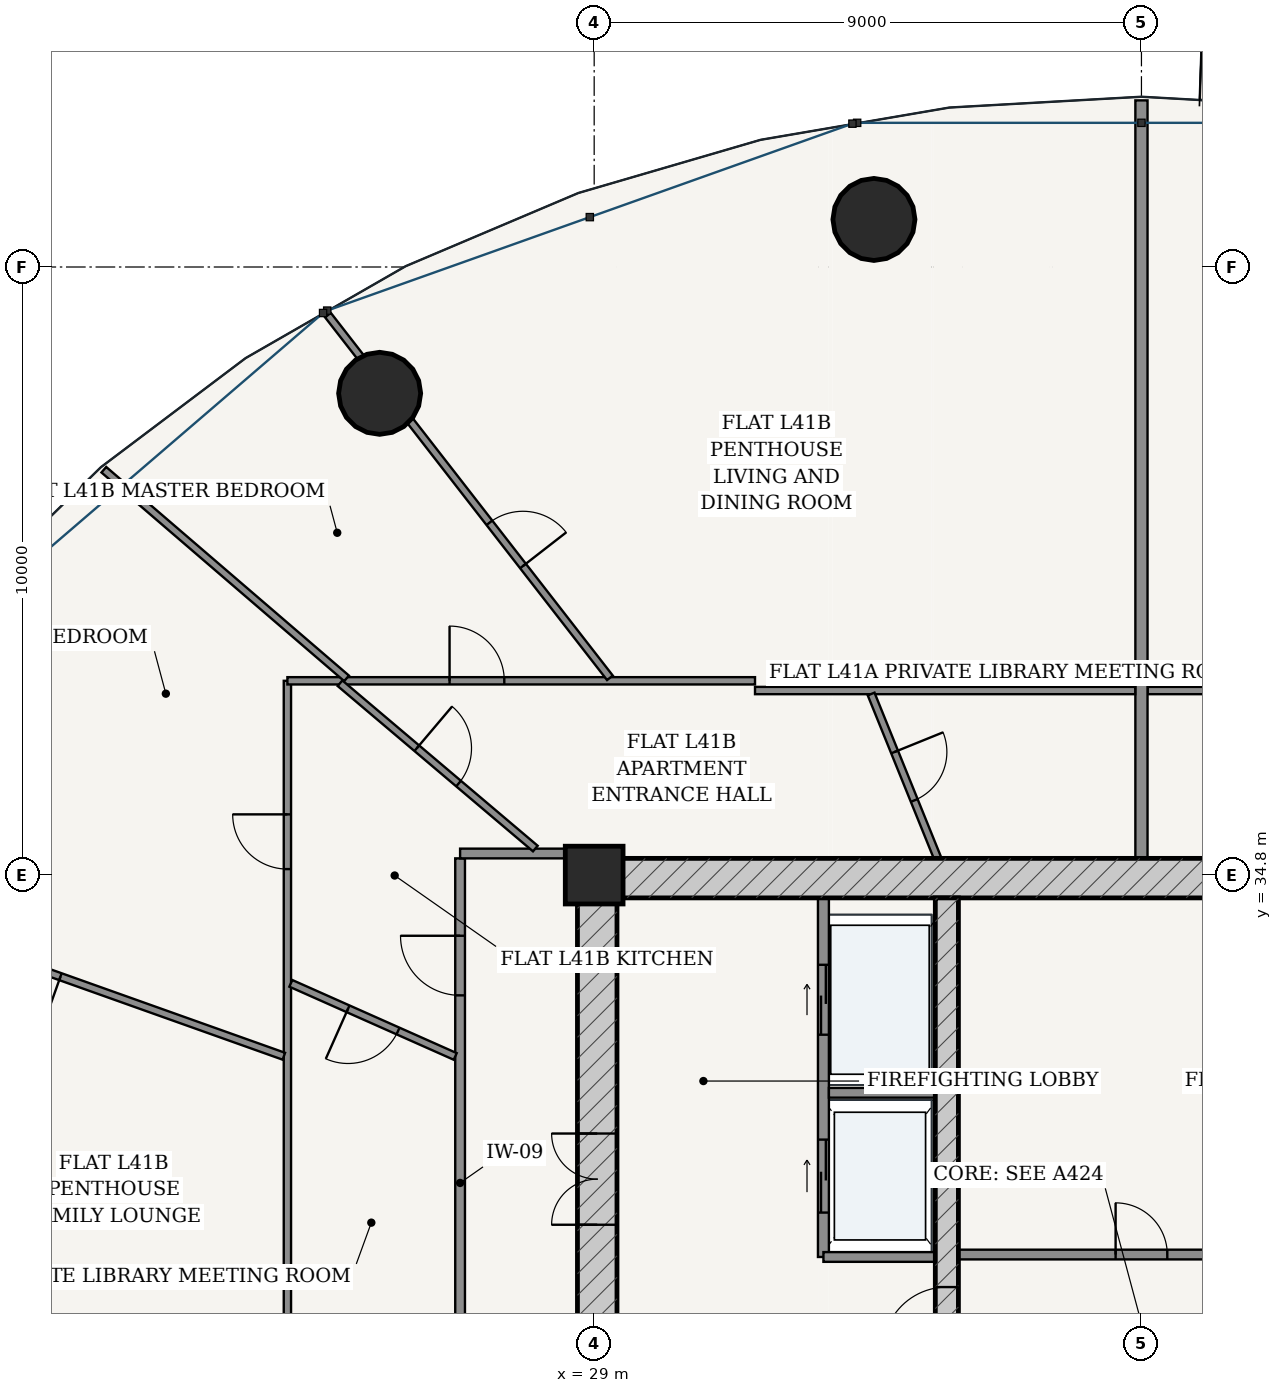
"""IFC4 building model, lengths in metres.
Left out: names, types, materials, properties, quantities, classifications, styles, units other than length and angle.
Written with IfcOpenShell. Run it as: python <this file> out.ifc"""

import sys

from ifc_helpers import new_model, si_unit, direction, frame, frame_2d, origin, origin_2d, place, context, subcontext, project, spatial, rectangle, hollow_circle, extrude, source, transform, mapped, element, fill, save


model = new_model("IFC4")
c1 = context("Model", 3, precision=1e-05, world=origin(), true_north=direction((-0.2419218956, 0.970295726276)))
c2 = subcontext(c1, "Body", "Model", "MODEL_VIEW")
j1 = project(units=[si_unit("LENGTHUNIT", "METRE"), si_unit("PLANEANGLEUNIT", "RADIAN")], contexts=[c1])
p1 = place(None, origin())
s1 = spatial("IfcSite", under=j1, at=p1, CompositionType="ELEMENT")
p2 = place(p1, origin())
s2 = spatial("IfcBuilding", under=s1, at=p2, CompositionType="ELEMENT")
p3 = place(p2, frame((0.0, 0.0, 157.0)))
s3 = spatial("IfcBuildingStorey", under=s2, at=p3, CompositionType="ELEMENT", Elevation=157.0)
p4 = place(p3, frame((29.0, 34.8, 0.0), z_axis=(0.0, 0.0, 1.0), x_axis=(1.0, 0.0, 0.0)))
e1 = element("IfcColumn", 1, at=p4, inside=s3, PredefinedType="COLUMN", context=c2, shape_type="SweptSolid", body=[
    extrude(rectangle(XDim=0.95, YDim=0.95, at=origin_2d()), origin(), (0.0, 0.0, 1.0), 3.6),
])
p5 = place(p3, frame((28.725, 34.75, 0.0), z_axis=(0.0, 0.0, 1.0), x_axis=(1.0, 0.0, 0.0)))
e2 = element("IfcWall", 2, at=p5, inside=s3, PredefinedType="SHEAR", context=c2, shape_type="SweptSolid", body=[
    extrude(rectangle(XDim=18.55, YDim=0.65, at=frame_2d((9.275, 0.0))), origin(), (0.0, 0.0, 1.0), 3.33),
])
p6 = place(p3, frame((29.05, 19.175, 0.0), z_axis=(0.0, 0.0, 1.0), x_axis=(0.0, 1.0, 0.0)))
e3 = element("IfcWall", 3, at=p6, inside=s3, PredefinedType="SHEAR", context=c2, shape_type="SweptSolid", body=[
    extrude(rectangle(XDim=15.25, YDim=0.65, at=frame_2d((7.625, 0.0))), origin(), (0.0, 0.0, 1.0), 3.33),
])
p7 = place(p6, frame((9.875, 0.0, 0.0)))
e4 = element("IfcOpeningElement", 4, at=p7, cuts=e3, PredefinedType="OPENING", context=c2, shape_type="SweptSolid", body=[
    extrude(rectangle(XDim=1.5, YDim=2.2, at=frame_2d((0.75, 1.1))), frame((0.0, 0.335, 0.0), z_axis=(0.0, -1.0, 0.0), x_axis=(1.0, 0.0, 0.0)), (0.0, 0.0, 1.0), 0.67),
])
p8 = place(p3, frame((34.8, 19.175, 0.0), z_axis=(0.0, 0.0, 1.0), x_axis=(0.0, 1.0, 0.0)))
e5 = element("IfcWall", 5, at=p8, inside=s3, PredefinedType="SHEAR", context=c2, shape_type="SweptSolid", body=[
    extrude(rectangle(XDim=15.25, YDim=0.38, at=frame_2d((7.625, 0.0))), origin(), (0.0, 0.0, 1.0), 3.33),
])
p9 = place(p8, frame((7.8, 0.0, 0.0)))
e6 = element("IfcOpeningElement", 6, at=p9, cuts=e5, PredefinedType="OPENING", context=c2, shape_type="SweptSolid", body=[
    extrude(rectangle(XDim=1.05, YDim=2.15, at=frame_2d((0.525, 1.075))), frame((0.0, 0.2, 0.0), z_axis=(0.0, -1.0, 0.0), x_axis=(1.0, 0.0, 0.0)), (0.0, 0.0, 1.0), 0.4),
])
for number, where, z_axis, x_axis in (
    (7, (33.601, 45.582, 0.0), (0.0, 0.0, 1.0), (1.0, 0.0, 0.0)),
    (8, (25.472, 42.723, 0.0), (0.0, 0.0, 1.0), (1.0, 0.0, 0.0)),
):
    element("IfcColumn", number, at=place(p3, frame(where, z_axis=z_axis, x_axis=x_axis)), inside=s3, PredefinedType="COLUMN", context=c2, shape_type="SweptSolid", body=[
        extrude(hollow_circle(Radius=0.675, WallThickness=0.042, at=origin_2d()), origin(), (0.0, 0.0, 1.0), 3.6),
    ])
p10 = place(p3, frame((32.77, 28.52, 0.0), z_axis=(0.0, 0.0, 1.0), x_axis=(0.0, 1.0, 0.0)))
e9 = element("IfcWall", 9, at=p10, inside=s3, PredefinedType="PARTITIONING", context=c2, shape_type="SweptSolid", body=[
    extrude(rectangle(XDim=5.905, YDim=0.18, at=frame_2d((2.953, 0.0))), origin(), (0.0, 0.0, 1.0), 3.33),
])
p11 = place(p10, frame((3.655, 0.0, 0.0)))
e10 = element("IfcOpeningElement", 10, at=p11, cuts=e9, PredefinedType="OPENING", context=c2, shape_type="SweptSolid", body=[
    extrude(rectangle(XDim=1.15, YDim=2.2, at=frame_2d((0.575, 1.1))), frame((0.0, 0.1, 0.0), z_axis=(0.0, -1.0, 0.0), x_axis=(1.0, 0.0, 0.0)), (0.0, 0.0, 1.0), 0.2),
])
p12 = place(p10, frame((0.73, 0.0, 0.0)))
e11 = element("IfcOpeningElement", 11, at=p12, cuts=e9, PredefinedType="OPENING", context=c2, shape_type="SweptSolid", body=[
    extrude(rectangle(XDim=1.2, YDim=2.25, at=frame_2d((0.6, 1.125))), frame((0.0, 0.1, 0.0), z_axis=(0.0, -1.0, 0.0), x_axis=(1.0, 0.0, 0.0)), (0.0, 0.0, 1.0), 0.2),
])
p13 = place(p3, frame((32.86, 31.22, 0.0), z_axis=(0.0, 0.0, 1.0), x_axis=(1.0, 0.0, 0.0)))
e12 = element("IfcWall", 12, at=p13, inside=s3, PredefinedType="PARTITIONING", context=c2, shape_type="SweptSolid", body=[
    extrude(rectangle(XDim=1.75, YDim=0.16, at=frame_2d((0.875, 0.0))), origin(), (0.0, 0.0, 1.0), 3.33),
])
p14 = place(p3, frame((32.77, 28.52, 0.0), z_axis=(0.0, 0.0, 1.0), x_axis=(1.0, 0.0, 0.0)))
e13 = element("IfcWall", 13, at=p14, inside=s3, PredefinedType="PARTITIONING", context=c2, shape_type="SweptSolid", body=[
    extrude(rectangle(XDim=1.84, YDim=0.16, at=frame_2d((0.92, 0.0))), origin(), (0.0, 0.0, 1.0), 3.33),
])
p15 = place(p3, frame((34.99, 28.56, 0.0), z_axis=(0.0, 0.0, 1.0), x_axis=(1.0, 0.0, 0.0)))
e14 = element("IfcWall", 14, at=p15, inside=s3, PredefinedType="PARTITIONING", context=c2, shape_type="SweptSolid", body=[
    extrude(rectangle(XDim=6.02, YDim=0.16, at=frame_2d((3.01, 0.0))), origin(), (0.0, 0.0, 1.0), 3.33),
])
p16 = place(p15, frame((2.585, 0.0, 0.0)))
e15 = element("IfcOpeningElement", 15, at=p16, cuts=e14, PredefinedType="OPENING", context=c2, shape_type="SweptSolid", body=[
    extrude(rectangle(XDim=0.85, YDim=2.1, at=frame_2d((0.425, 1.05))), frame((0.0, 0.09, 0.0), z_axis=(0.0, -1.0, 0.0), x_axis=(1.0, 0.0, 0.0)), (0.0, 0.0, 1.0), 0.18),
])
p17 = place(p3, frame((26.795, 24.4, 0.0), z_axis=(0.0, 0.0, 1.0), x_axis=(0.0, 1.0, 0.0)))
e16 = element("IfcWall", 16, at=p17, inside=s3, PredefinedType="PARTITIONING", context=c2, shape_type="SweptSolid", body=[
    extrude(rectangle(XDim=10.675, YDim=0.16, at=frame_2d((5.337, 0.0))), origin(), (0.0, 0.0, 1.0), 2.776),
])
p18 = place(p17, frame((8.422, 0.0, 0.0)))
e17 = element("IfcOpeningElement", 17, at=p18, cuts=e16, PredefinedType="OPENING", context=c2, shape_type="SweptSolid", body=[
    extrude(rectangle(XDim=0.98, YDim=2.2, at=frame_2d((0.49, 1.1))), frame((0.0, 0.09, 0.0), z_axis=(0.0, -1.0, 0.0), x_axis=(1.0, 0.0, 0.0)), (0.0, 0.0, 1.0), 0.18),
])
p19 = place(p3, frame((26.795, 35.155, 0.0), z_axis=(0.0, 0.0, 1.0), x_axis=(1.0, 0.0, 0.0)))
e18 = element("IfcWall", 18, at=p19, inside=s3, PredefinedType="PARTITIONING", context=c2, shape_type="SweptSolid", body=[
    extrude(rectangle(XDim=1.93, YDim=0.16, at=frame_2d((0.965, 0.0))), origin(), (0.0, 0.0, 1.0), 2.776),
])
p20 = place(p3, frame((38.102, 37.835, 0.0), z_axis=(0.0, 0.0, 1.0), x_axis=(1.0, 0.0, 0.0)))
e19 = element("IfcWall", 19, at=p20, inside=s3, PredefinedType="PARTITIONING", context=c2, shape_type="SweptSolid", body=[
    extrude(rectangle(XDim=6.253, YDim=0.12, at=frame_2d((3.126, 0.0))), origin(), (0.0, 0.0, 1.0), 2.776),
])
p21 = place(p20, frame((3.742, 0.0, 0.0)))
e20 = element("IfcOpeningElement", 20, at=p21, cuts=e19, PredefinedType="OPENING", context=c2, shape_type="SweptSolid", body=[
    extrude(rectangle(XDim=0.9, YDim=2.15, at=frame_2d((0.45, 1.075))), frame((0.0, 0.07, 0.0), z_axis=(0.0, -1.0, 0.0), x_axis=(1.0, 0.0, 0.0)), (0.0, 0.0, 1.0), 0.14),
])
p22 = place(p3, frame((38.0, 35.075, 0.0), z_axis=(0.0, 0.0, 1.0), x_axis=(0.0, 1.0, 0.0)))
e21 = element("IfcWall", 21, at=p22, inside=s3, PredefinedType="PARTITIONING", context=c2, shape_type="SweptSolid", body=[
    extrude(rectangle(XDim=12.465, YDim=0.2, at=frame_2d((6.232, 0.0))), origin(), (0.0, 0.0, 1.0), 2.415),
])
p23 = place(p3, frame((23.955, 26.902, 0.0), z_axis=(0.0, 0.0, 1.0), x_axis=(0.0, 1.0, 0.0)))
e22 = element("IfcWall", 22, at=p23, inside=s3, PredefinedType="PARTITIONING", context=c2, shape_type="SweptSolid", body=[
    extrude(rectangle(XDim=11.093, YDim=0.12, at=frame_2d((5.546, 0.0))), origin(), (0.0, 0.0, 1.0), 2.776),
])
p24 = place(p23, frame((7.997, 0.0, 0.0)))
e23 = element("IfcOpeningElement", 23, at=p24, cuts=e22, PredefinedType="OPENING", context=c2, shape_type="SweptSolid", body=[
    extrude(rectangle(XDim=0.9, YDim=2.15, at=frame_2d((0.45, 1.075))), frame((0.0, 0.07, 0.0), z_axis=(0.0, -1.0, 0.0), x_axis=(1.0, 0.0, 0.0)), (0.0, 0.0, 1.0), 0.14),
])
p25 = place(p3, frame((23.955, 37.995, 0.0), z_axis=(0.0, 0.0, 1.0), x_axis=(1.0, 0.0, 0.0)))
e24 = element("IfcWall", 24, at=p25, inside=s3, PredefinedType="PARTITIONING", context=c2, shape_type="SweptSolid", body=[
    extrude(rectangle(XDim=7.69, YDim=0.12, at=frame_2d((3.845, 0.0))), origin(), (0.0, 0.0, 1.0), 2.776),
])
p26 = place(p25, frame((2.667, 0.0, 0.0)))
e25 = element("IfcOpeningElement", 25, at=p26, cuts=e24, PredefinedType="OPENING", context=c2, shape_type="SweptSolid", body=[
    extrude(rectangle(XDim=0.9, YDim=2.15, at=frame_2d((0.45, 1.075))), frame((0.0, 0.07, 0.0), z_axis=(0.0, -1.0, 0.0), x_axis=(1.0, 0.0, 0.0)), (0.0, 0.0, 1.0), 0.14),
])
p27 = place(p3, frame((31.645, 37.835, 0.0), z_axis=(0.0, 0.0, 1.0), x_axis=(1.0, 0.0, 0.0)))
e26 = element("IfcWall", 26, at=p27, inside=s3, PredefinedType="PARTITIONING", context=c2, shape_type="SweptSolid", body=[
    extrude(rectangle(XDim=6.253, YDim=0.12, at=frame_2d((3.126, 0.0))), origin(), (0.0, 0.0, 1.0), 2.776),
])
p28 = place(p3, frame((29.259, 38.044, 0.0), z_axis=(0.0, 0.0, 1.0), x_axis=(-0.613770587295, 0.789484430607, 0.0)))
e27 = element("IfcWall", 27, at=p28, inside=s3, PredefinedType="PARTITIONING", context=c2, shape_type="SweptSolid", body=[
    extrude(rectangle(XDim=7.556, YDim=0.12, at=frame_2d((3.778, 0.0))), origin(), (0.0, 0.0, 1.0), 2.776),
])
p29 = place(p28, frame((2.33, 0.0, 0.0)))
e28 = element("IfcOpeningElement", 28, at=p29, cuts=e27, PredefinedType="OPENING", context=c2, shape_type="SweptSolid", body=[
    extrude(rectangle(XDim=0.9, YDim=2.15, at=frame_2d((0.45, 1.075))), frame((0.0, 0.07, 0.0), z_axis=(0.0, -1.0, 0.0), x_axis=(1.0, 0.0, 0.0)), (0.0, 0.0, 1.0), 0.14),
])
p30 = place(p3, frame((24.928, 38.035, 0.0), z_axis=(0.0, 0.0, 1.0), x_axis=(-0.758368609512, 0.65182593697, 0.0)))
e29 = element("IfcWall", 29, at=p30, inside=s3, PredefinedType="PARTITIONING", context=c2, shape_type="SweptSolid", body=[
    extrude(rectangle(XDim=5.263, YDim=0.12, at=frame_2d((2.632, 0.0))), origin(), (0.0, 0.0, 1.0), 2.846),
])
p31 = place(p3, frame((23.896, 31.821, 0.0), z_axis=(0.0, 0.0, 1.0), x_axis=(-0.942072876428, 0.335408251983, 0.0)))
e30 = element("IfcWall", 30, at=p31, inside=s3, PredefinedType="PARTITIONING", context=c2, shape_type="SweptSolid", body=[
    extrude(rectangle(XDim=8.7, YDim=0.12, at=frame_2d((4.35, 0.0))), origin(), (0.0, 0.0, 1.0), 2.846),
])
p32 = place(p31, frame((3.9, 0.0, 0.0)))
e31 = element("IfcOpeningElement", 31, at=p32, cuts=e30, PredefinedType="OPENING", context=c2, shape_type="SweptSolid", body=[
    extrude(rectangle(XDim=0.9, YDim=2.15, at=frame_2d((0.45, 1.075))), frame((0.0, 0.07, 0.0), z_axis=(0.0, -1.0, 0.0), x_axis=(1.0, 0.0, 0.0)), (0.0, 0.0, 1.0), 0.14),
])
p33 = place(p3, frame((34.649, 35.075, 0.0), z_axis=(0.0, 0.0, 1.0), x_axis=(-0.37535719187, 0.926880239573, 0.0)))
e32 = element("IfcWall", 32, at=p33, inside=s3, PredefinedType="PARTITIONING", context=c2, shape_type="SweptSolid", body=[
    extrude(rectangle(XDim=2.916, YDim=0.12, at=frame_2d((1.458, 0.0))), origin(), (0.0, 0.0, 1.0), 3.33),
])
p34 = place(p33, frame((1.028, 0.0, 0.0)))
e33 = element("IfcOpeningElement", 33, at=p34, cuts=e32, PredefinedType="OPENING", context=c2, shape_type="SweptSolid", body=[
    extrude(rectangle(XDim=0.86, YDim=2.15, at=frame_2d((0.43, 1.075))), frame((0.0, 0.07, 0.0), z_axis=(0.0, -1.0, 0.0), x_axis=(1.0, 0.0, 0.0)), (0.0, 0.0, 1.0), 0.14),
])
p35 = place(p3, frame((28.032, 35.236, 0.0), z_axis=(0.0, 0.0, 1.0), x_axis=(-0.763324664245, 0.646015059388, 0.0)))
e34 = element("IfcWall", 34, at=p35, inside=s3, PredefinedType="PARTITIONING", context=c2, shape_type="SweptSolid", body=[
    extrude(rectangle(XDim=4.208, YDim=0.12, at=frame_2d((2.104, 0.0))), origin(), (0.0, 0.0, 1.0), 3.005),
])
p36 = place(p35, frame((1.654, 0.0, 0.0)))
e35 = element("IfcOpeningElement", 35, at=p36, cuts=e34, PredefinedType="OPENING", context=c2, shape_type="SweptSolid", body=[
    extrude(rectangle(XDim=0.9, YDim=2.15, at=frame_2d((0.45, 1.075))), frame((0.0, 0.07, 0.0), z_axis=(0.0, -1.0, 0.0), x_axis=(1.0, 0.0, 0.0)), (0.0, 0.0, 1.0), 0.14),
])
p37 = place(p3, frame((26.715, 31.818, 0.0), z_axis=(0.0, 0.0, 1.0), x_axis=(-0.91376049718, 0.406253312347, 0.0)))
e36 = element("IfcWall", 36, at=p37, inside=s3, PredefinedType="PARTITIONING", context=c2, shape_type="SweptSolid", body=[
    extrude(rectangle(XDim=2.958, YDim=0.12, at=frame_2d((1.479, 0.0))), origin(), (0.0, 0.0, 1.0), 3.33),
])
p38 = place(p37, frame((1.029, 0.0, 0.0)))
e37 = element("IfcOpeningElement", 37, at=p38, cuts=e36, PredefinedType="OPENING", context=c2, shape_type="SweptSolid", body=[
    extrude(rectangle(XDim=0.9, YDim=2.15, at=frame_2d((0.45, 1.075))), frame((0.0, 0.07, 0.0), z_axis=(0.0, -1.0, 0.0), x_axis=(1.0, 0.0, 0.0)), (0.0, 0.0, 1.0), 0.14),
])
m1 = source(origin(), c2, "Body", "SweptSolid", [
    extrude(rectangle(XDim=1.5, YDim=2.2, at=frame_2d((0.75, 1.1))), frame((0.0, 0.025, 0.0), z_axis=(0.0, -1.0, 0.0), x_axis=(1.0, 0.0, 0.0)), (0.0, 0.0, 1.0), 0.05),
])
p39 = place(p7, origin())
e38 = element("IfcDoor", 38, at=p39, inside=s3, OperationType="DOUBLE_DOOR_SINGLE_SWING", PredefinedType="DOOR", context=c2, shape_type="MappedRepresentation", body=[
    mapped(m1, transform((0.0, 0.0, 0.0), scale=1.0)),
])
fill(e4, e38)
m2 = source(origin(), c2, "Body", "SweptSolid", [
    extrude(rectangle(XDim=1.05, YDim=2.15, at=frame_2d((0.525, 1.075))), frame((0.0, 0.025, 0.0), z_axis=(0.0, -1.0, 0.0), x_axis=(1.0, 0.0, 0.0)), (0.0, 0.0, 1.0), 0.05),
])
p40 = place(p9, origin())
e39 = element("IfcDoor", 39, at=p40, inside=s3, OperationType="SINGLE_SWING_LEFT", PredefinedType="DOOR", context=c2, shape_type="MappedRepresentation", body=[
    mapped(m2, transform((0.0, 0.0, 0.0), scale=1.0)),
])
fill(e6, e39)
m3 = source(origin(), c2, "Body", "SweptSolid", [
    extrude(rectangle(XDim=0.85, YDim=2.1, at=frame_2d((0.425, 1.05))), frame((0.0, 0.025, 0.0), z_axis=(0.0, -1.0, 0.0), x_axis=(1.0, 0.0, 0.0)), (0.0, 0.0, 1.0), 0.05),
])
p41 = place(p16, origin())
e40 = element("IfcDoor", 40, at=p41, inside=s3, OperationType="SINGLE_SWING_LEFT", PredefinedType="DOOR", context=c2, shape_type="MappedRepresentation", body=[
    mapped(m3, transform((0.0, 0.0, 0.0), scale=1.0)),
])
fill(e15, e40)
m4 = source(origin(), c2, "Body", "SweptSolid", [
    extrude(rectangle(XDim=1.15, YDim=2.2, at=frame_2d((0.575, 1.1))), frame((0.0, 0.025, 0.0), z_axis=(0.0, -1.0, 0.0), x_axis=(1.0, 0.0, 0.0)), (0.0, 0.0, 1.0), 0.05),
])
p42 = place(p11, origin())
e41 = element("IfcDoor", 41, at=p42, inside=s3, OperationType="DOUBLE_DOOR_SLIDING", PredefinedType="DOOR", context=c2, shape_type="MappedRepresentation", body=[
    mapped(m4, transform((0.0, 0.0, 0.0), scale=1.0)),
])
fill(e10, e41)
m5 = source(origin(), c2, "Body", "SweptSolid", [
    extrude(rectangle(XDim=1.2, YDim=2.25, at=frame_2d((0.6, 1.125))), frame((0.0, 0.025, 0.0), z_axis=(0.0, -1.0, 0.0), x_axis=(1.0, 0.0, 0.0)), (0.0, 0.0, 1.0), 0.05),
])
p43 = place(p12, origin())
e42 = element("IfcDoor", 42, at=p43, inside=s3, OperationType="DOUBLE_DOOR_SLIDING", PredefinedType="DOOR", context=c2, shape_type="MappedRepresentation", body=[
    mapped(m5, transform((0.0, 0.0, 0.0), scale=1.0)),
])
fill(e11, e42)
m6 = source(origin(), c2, "Body", "SweptSolid", [
    extrude(rectangle(XDim=0.98, YDim=2.2, at=frame_2d((0.49, 1.1))), frame((0.0, 0.025, 0.0), z_axis=(0.0, -1.0, 0.0), x_axis=(1.0, 0.0, 0.0)), (0.0, 0.0, 1.0), 0.05),
])
p44 = place(p18, origin())
e43 = element("IfcDoor", 43, at=p44, inside=s3, OperationType="SINGLE_SWING_RIGHT", PredefinedType="DOOR", context=c2, shape_type="MappedRepresentation", body=[
    mapped(m6, transform((0.0, 0.0, 0.0), scale=1.0)),
])
fill(e17, e43)
m7 = source(origin(), c2, "Body", "SweptSolid", [
    extrude(rectangle(XDim=0.9, YDim=2.15, at=frame_2d((0.45, 1.075))), frame((0.0, 0.025, 0.0), z_axis=(0.0, -1.0, 0.0), x_axis=(1.0, 0.0, 0.0)), (0.0, 0.0, 1.0), 0.05),
])
p45 = place(p36, frame((0.9, 0.0, 0.0), z_axis=(0.0, 0.0, 1.0), x_axis=(-1.0, 0.0, 0.0)))
e44 = element("IfcDoor", 44, at=p45, inside=s3, OperationType="SINGLE_SWING_LEFT", PredefinedType="DOOR", context=c2, shape_type="MappedRepresentation", body=[
    mapped(m7, transform((0.0, 0.0, 0.0), scale=1.0)),
])
fill(e35, e44)
p46 = place(p38, origin())
e45 = element("IfcDoor", 45, at=p46, inside=s3, OperationType="SINGLE_SWING_RIGHT", PredefinedType="DOOR", context=c2, shape_type="MappedRepresentation", body=[
    mapped(m7, transform((0.0, 0.0, 0.0), scale=1.0)),
])
fill(e37, e45)
p47 = place(p26, origin())
e46 = element("IfcDoor", 46, at=p47, inside=s3, OperationType="SINGLE_SWING_LEFT", PredefinedType="DOOR", context=c2, shape_type="MappedRepresentation", body=[
    mapped(m7, transform((0.0, 0.0, 0.0), scale=1.0)),
])
fill(e25, e46)
p48 = place(p24, origin())
e47 = element("IfcDoor", 47, at=p48, inside=s3, OperationType="SINGLE_SWING_RIGHT", PredefinedType="DOOR", context=c2, shape_type="MappedRepresentation", body=[
    mapped(m7, transform((0.0, 0.0, 0.0), scale=1.0)),
])
fill(e23, e47)
m8 = source(origin(), c2, "Body", "SweptSolid", [
    extrude(rectangle(XDim=0.86, YDim=2.15, at=frame_2d((0.43, 1.075))), frame((0.0, 0.025, 0.0), z_axis=(0.0, -1.0, 0.0), x_axis=(1.0, 0.0, 0.0)), (0.0, 0.0, 1.0), 0.05),
])
p49 = place(p34, frame((0.86, 0.0, 0.0), z_axis=(0.0, 0.0, 1.0), x_axis=(-1.0, 0.0, 0.0)))
e48 = element("IfcDoor", 48, at=p49, inside=s3, OperationType="SINGLE_SWING_LEFT", PredefinedType="DOOR", context=c2, shape_type="MappedRepresentation", body=[
    mapped(m8, transform((0.0, 0.0, 0.0), scale=1.0)),
])
fill(e33, e48)
p50 = place(p29, frame((0.9, 0.0, 0.0), z_axis=(0.0, 0.0, 1.0), x_axis=(-1.0, 0.0, 0.0)))
e49 = element("IfcDoor", 49, at=p50, inside=s3, OperationType="SINGLE_SWING_RIGHT", PredefinedType="DOOR", context=c2, shape_type="MappedRepresentation", body=[
    mapped(m7, transform((0.0, 0.0, 0.0), scale=1.0)),
])
fill(e28, e49)
p51 = place(p32, origin())
e50 = element("IfcDoor", 50, at=p51, inside=s3, OperationType="SINGLE_SWING_LEFT", PredefinedType="DOOR", context=c2, shape_type="MappedRepresentation", body=[
    mapped(m7, transform((0.0, 0.0, 0.0), scale=1.0)),
])
fill(e31, e50)
save(model, sys.argv[1])
